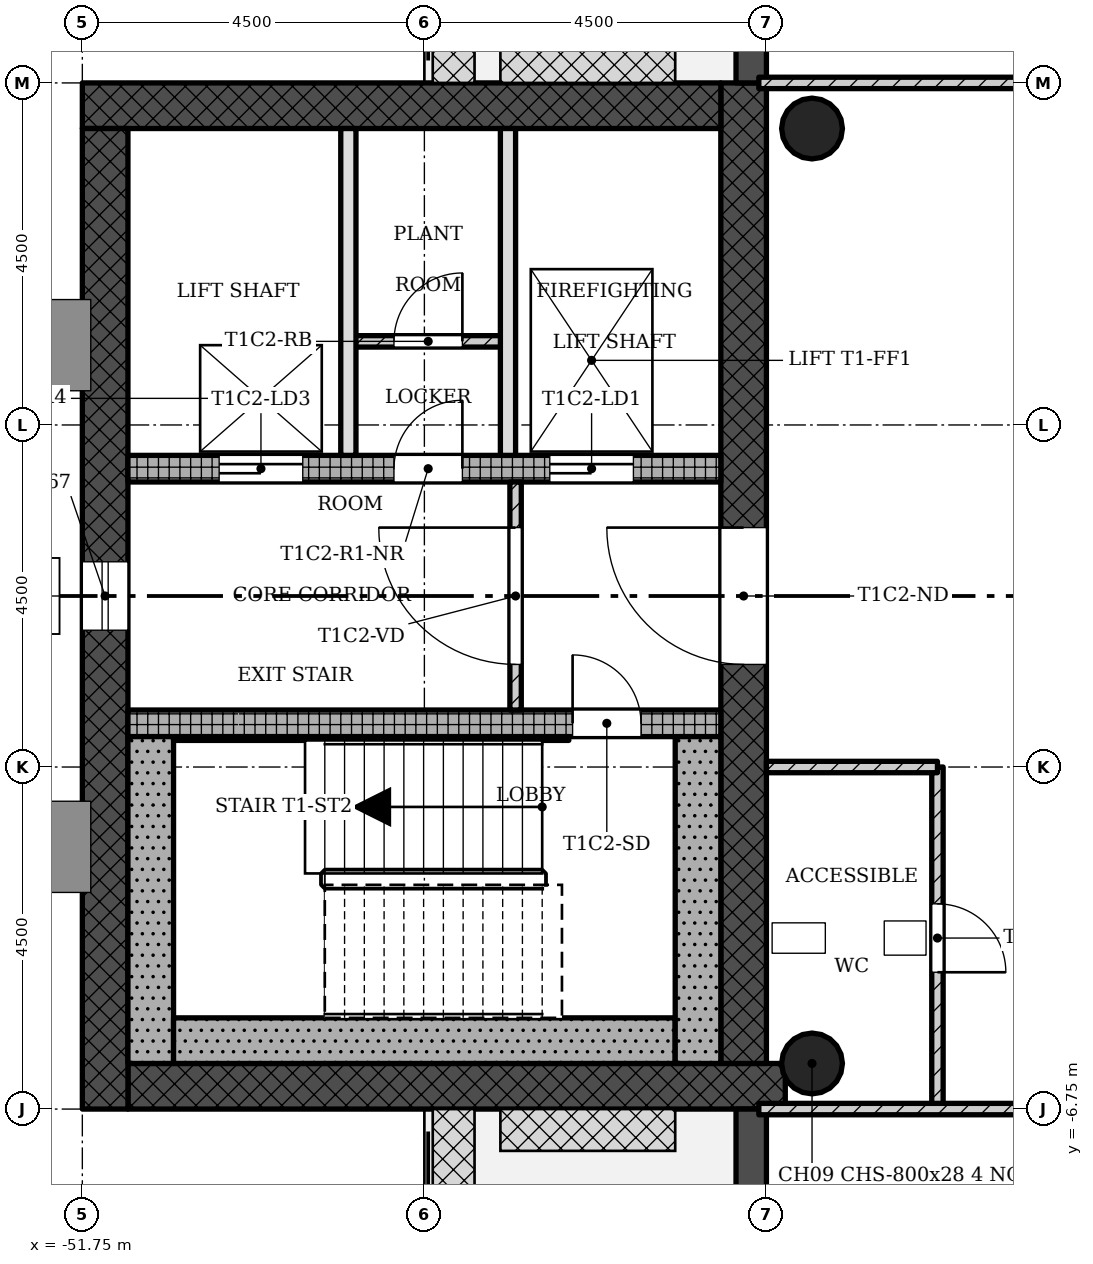
"""IFC4 building model, lengths in metres.
Left out: names, types, materials, properties, quantities, classifications, styles, units other than length and angle.
Written with IfcOpenShell. Run it as: python <this file> out.ifc"""

import sys

from ifc_helpers import new_model, si_unit, direction, frame, frame_2d, origin, origin_2d, place, context, subcontext, project, spatial, rectangle, hollow_circle, extrude, element, fill, save


model = new_model("IFC4")
c1 = context("Model", 3, precision=1e-05, world=origin(), true_north=direction((0.0, 1.0)))
c2 = subcontext(c1, "Body", "Model", "MODEL_VIEW")
j1 = project(units=[si_unit("LENGTHUNIT", "METRE"), si_unit("PLANEANGLEUNIT", "RADIAN")], contexts=[c1])
p1 = place(None, origin())
s1 = spatial("IfcSite", under=j1, at=p1, CompositionType="ELEMENT")
p2 = place(p1, origin())
s2 = spatial("IfcBuilding", under=s1, at=p2, CompositionType="ELEMENT")
p3 = place(p2, frame((0.0, 0.0, 242.4)))
s3 = spatial("IfcBuildingStorey", under=s2, at=p3, CompositionType="ELEMENT", Elevation=242.4)
p4 = place(p3, frame((-51.15, -6.45, 0.0), z_axis=(0.0, 0.0, 1.0), x_axis=(1.0, 0.0, 0.0)))
e1 = element("IfcWall", 1, at=p4, inside=s3, PredefinedType="SHEAR", context=c2, shape_type="SweptSolid", body=[
    extrude(rectangle(XDim=8.648, YDim=0.6, at=frame_2d((4.324, 0.0))), origin(), (0.0, 0.0, 1.0), 4.5),
])
p5 = place(p3, frame((-43.05, -6.15, 0.0), z_axis=(0.0, 0.0, 1.0), x_axis=(0.0, 1.0, 0.0)))
e2 = element("IfcWall", 2, at=p5, inside=s3, PredefinedType="SHEAR", context=c2, shape_type="SweptSolid", body=[
    extrude(rectangle(XDim=12.9, YDim=0.6, at=frame_2d((6.45, 0.0))), origin(), (0.0, 0.0, 1.0), 4.5),
])
p6 = place(p5, frame((5.25, 0.0, 0.0)))
e3 = element("IfcOpeningElement", 3, at=p6, cuts=e2, PredefinedType="OPENING", context=c2, shape_type="SweptSolid", body=[
    extrude(rectangle(XDim=1.8, YDim=2.1, at=frame_2d((0.9, 1.05))), frame((0.0, 0.31, 0.0), z_axis=(0.0, -1.0, 0.0), x_axis=(1.0, 0.0, 0.0)), (0.0, 0.0, 1.0), 0.62),
])
p7 = place(p3, frame((-43.35, 6.45, 0.0), z_axis=(0.0, 0.0, 1.0), x_axis=(-1.0, 0.0, 0.0)))
e4 = element("IfcWall", 4, at=p7, inside=s3, PredefinedType="SHEAR", context=c2, shape_type="SweptSolid", body=[
    extrude(rectangle(XDim=8.4, YDim=0.6, at=frame_2d((4.2, 0.0))), origin(), (0.0, 0.0, 1.0), 4.5),
])
p8 = place(p3, frame((-51.45, 6.15, 0.0), z_axis=(0.0, 0.0, 1.0), x_axis=(0.0, -1.0, 0.0)))
e5 = element("IfcWall", 5, at=p8, inside=s3, PredefinedType="SHEAR", context=c2, shape_type="SweptSolid", body=[
    extrude(rectangle(XDim=12.9, YDim=0.6, at=frame_2d((6.45, 0.0))), origin(), (0.0, 0.0, 1.0), 4.5),
])
p9 = place(p8, frame((5.7, 0.0, 0.45)))
e6 = element("IfcOpeningElement", 6, at=p9, cuts=e5, PredefinedType="OPENING", context=c2, shape_type="SweptSolid", body=[
    extrude(rectangle(XDim=0.9, YDim=2.4, at=frame_2d((0.45, 1.2))), frame((0.0, 0.31, 0.0), z_axis=(0.0, -1.0, 0.0), x_axis=(1.0, 0.0, 0.0)), (0.0, 0.0, 1.0), 0.62),
])
p10 = place(p3, frame((-51.15, -1.675, 0.0), z_axis=(0.0, 0.0, 1.0), x_axis=(1.0, 0.0, 0.0)))
e7 = element("IfcWall", 7, at=p10, inside=s3, PredefinedType="SHEAR", context=c2, shape_type="SweptSolid", body=[
    extrude(rectangle(XDim=7.8, YDim=0.35, at=frame_2d((3.9, 0.0))), origin(), (0.0, 0.0, 1.0), 4.5),
])
p11 = place(p10, frame((5.85, 0.0, 0.0)))
e8 = element("IfcOpeningElement", 8, at=p11, cuts=e7, PredefinedType="OPENING", context=c2, shape_type="SweptSolid", body=[
    extrude(rectangle(XDim=0.9, YDim=2.1, at=frame_2d((0.45, 1.05))), frame((0.0, 0.185, 0.0), z_axis=(0.0, -1.0, 0.0), x_axis=(1.0, 0.0, 0.0)), (0.0, 0.0, 1.0), 0.37),
])
p12 = place(p3, frame((-51.15, 1.675, 0.0), z_axis=(0.0, 0.0, 1.0), x_axis=(1.0, 0.0, 0.0)))
e9 = element("IfcWall", 9, at=p12, inside=s3, PredefinedType="SHEAR", context=c2, shape_type="SweptSolid", body=[
    extrude(rectangle(XDim=7.8, YDim=0.35, at=frame_2d((3.9, 0.0))), origin(), (0.0, 0.0, 1.0), 4.5),
])
p13 = place(p12, frame((5.55, 0.0, 0.0)))
e10 = element("IfcOpeningElement", 10, at=p13, cuts=e9, PredefinedType="OPENING", context=c2, shape_type="SweptSolid", body=[
    extrude(rectangle(XDim=1.1, YDim=2.1, at=frame_2d((0.55, 1.05))), frame((0.0, 0.185, 0.0), z_axis=(0.0, -1.0, 0.0), x_axis=(1.0, 0.0, 0.0)), (0.0, 0.0, 1.0), 0.37),
])
p14 = place(p12, frame((1.2, 0.0, 0.0)))
e11 = element("IfcOpeningElement", 11, at=p14, cuts=e9, PredefinedType="OPENING", context=c2, shape_type="SweptSolid", body=[
    extrude(rectangle(XDim=1.1, YDim=2.1, at=frame_2d((0.55, 1.05))), frame((0.0, 0.185, 0.0), z_axis=(0.0, -1.0, 0.0), x_axis=(1.0, 0.0, 0.0)), (0.0, 0.0, 1.0), 0.37),
])
p15 = place(p12, frame((3.5, 0.0, 0.0)))
e12 = element("IfcOpeningElement", 12, at=p15, cuts=e9, PredefinedType="OPENING", context=c2, shape_type="SweptSolid", body=[
    extrude(rectangle(XDim=0.9, YDim=2.1, at=frame_2d((0.45, 1.05))), frame((0.0, 0.185, 0.0), z_axis=(0.0, -1.0, 0.0), x_axis=(1.0, 0.0, 0.0)), (0.0, 0.0, 1.0), 0.37),
])
for number, where, z_axis, x_axis in (
    (13, (-42.15, -6.15, 0.0), (0.0, 0.0, 1.0), (1.0, 0.0, 0.0)),
    (14, (-42.15, 6.15, 0.0), (0.0, 0.0, 1.0), (1.0, 0.0, 0.0)),
):
    element("IfcColumn", number, at=place(p3, frame(where, z_axis=z_axis, x_axis=x_axis)), inside=s3, PredefinedType="COLUMN", context=c2, shape_type="SweptSolid", body=[
        extrude(hollow_circle(Radius=0.4, WallThickness=0.028, at=origin_2d()), origin(), (0.0, 0.0, 1.0), 4.5),
    ])
p16 = place(p3, frame((-42.95, -6.75, -0.02), z_axis=(0.0, 0.0, 1.0), x_axis=(0.0, -1.0, 0.0)))
e15 = element("IfcWall", 15, at=p16, inside=s3, PredefinedType="STANDARD", context=c2, shape_type="SweptSolid", body=[
    extrude(rectangle(XDim=4.5, YDim=0.4, at=frame_2d((2.25, 0.0))), origin(), (0.0, 0.0, 1.0), 4.22),
])
p17 = place(p16, frame((1.35, 0.0, 0.02)))
e16 = element("IfcOpeningElement", 16, at=p17, cuts=e15, PredefinedType="OPENING", context=c2, shape_type="SweptSolid", body=[
    extrude(rectangle(XDim=1.8, YDim=2.1, at=frame_2d((0.9, 1.05))), frame((0.0, 0.21, 0.0), z_axis=(0.0, -1.0, 0.0), x_axis=(1.0, 0.0, 0.0)), (0.0, 0.0, 1.0), 0.42),
])
p18 = place(p3, frame((-42.95, 11.25, -0.02), z_axis=(0.0, 0.0, 1.0), x_axis=(0.0, -1.0, 0.0)))
e17 = element("IfcWall", 17, at=p18, inside=s3, PredefinedType="STANDARD", context=c2, shape_type="SweptSolid", body=[
    extrude(rectangle(XDim=4.5, YDim=0.4, at=frame_2d((2.25, 0.0))), origin(), (0.0, 0.0, 1.0), 4.22),
])
p19 = place(p18, frame((1.35, 0.0, 0.02)))
e18 = element("IfcOpeningElement", 18, at=p19, cuts=e17, PredefinedType="OPENING", context=c2, shape_type="SweptSolid", body=[
    extrude(rectangle(XDim=1.8, YDim=2.1, at=frame_2d((0.9, 1.05))), frame((0.0, 0.21, 0.0), z_axis=(0.0, -1.0, 0.0), x_axis=(1.0, 0.0, 0.0)), (0.0, 0.0, 1.0), 0.42),
])
p20 = place(p3, frame((-46.05, 1.5, 0.0), z_axis=(0.0, 0.0, 1.0), x_axis=(0.0, -1.0, 0.0)))
e19 = element("IfcWall", 19, at=p20, inside=s3, PredefinedType="PARTITIONING", context=c2, shape_type="SweptSolid", body=[
    extrude(rectangle(XDim=3.0, YDim=0.15, at=frame_2d((1.5, 0.0))), origin(), (0.0, 0.0, 1.0), 4.08),
])
p21 = place(p20, frame((0.6, 0.0, 0.0)))
e20 = element("IfcOpeningElement", 20, at=p21, cuts=e19, PredefinedType="OPENING", context=c2, shape_type="SweptSolid", body=[
    extrude(rectangle(XDim=1.8, YDim=2.1, at=frame_2d((0.9, 1.05))), frame((0.0, 0.085, 0.0), z_axis=(0.0, -1.0, 0.0), x_axis=(1.0, 0.0, 0.0)), (0.0, 0.0, 1.0), 0.17),
])
for number, where, z_axis, x_axis in (
    (21, (-48.25, 6.15, 0.0), (0.0, 0.0, 1.0), (0.0, -1.0, 0.0)),
    (22, (-46.15, 6.15, 0.0), (0.0, 0.0, 1.0), (0.0, -1.0, 0.0)),
):
    element("IfcWall", number, at=place(p3, frame(where, z_axis=z_axis, x_axis=x_axis)), inside=s3, PredefinedType="SOLIDWALL", context=c2, shape_type="SweptSolid", body=[
        extrude(rectangle(XDim=4.3, YDim=0.2, at=frame_2d((2.15, 0.0))), origin(), (0.0, 0.0, 1.0), 4.08),
    ])
p22 = place(p3, frame((-46.15, 3.35, 0.0), z_axis=(0.0, 0.0, 1.0), x_axis=(-1.0, 0.0, 0.0)))
e23 = element("IfcWall", 23, at=p22, inside=s3, PredefinedType="PARTITIONING", context=c2, shape_type="SweptSolid", body=[
    extrude(rectangle(XDim=2.1, YDim=0.15, at=frame_2d((1.05, 0.0))), origin(), (0.0, 0.0, 1.0), 4.08),
])
p23 = place(p22, frame((0.6, 0.0, 0.0)))
e24 = element("IfcOpeningElement", 24, at=p23, cuts=e23, PredefinedType="OPENING", context=c2, shape_type="SweptSolid", body=[
    extrude(rectangle(XDim=0.9, YDim=2.1, at=frame_2d((0.45, 1.05))), frame((0.0, 0.085, 0.0), z_axis=(0.0, -1.0, 0.0), x_axis=(1.0, 0.0, 0.0)), (0.0, 0.0, 1.0), 0.17),
])
p24 = place(p3, frame((-40.5, -6.75, 0.0), z_axis=(0.0, 0.0, 1.0), x_axis=(0.0, 1.0, 0.0)))
e25 = element("IfcWall", 25, at=p24, inside=s3, PredefinedType="PARTITIONING", context=c2, shape_type="SweptSolid", body=[
    extrude(rectangle(XDim=4.5, YDim=0.15, at=frame_2d((2.25, 0.0))), origin(), (0.0, 0.0, 1.0), 4.08),
])
p25 = place(p24, frame((1.8, 0.0, 0.0)))
e26 = element("IfcOpeningElement", 26, at=p25, cuts=e25, PredefinedType="OPENING", context=c2, shape_type="SweptSolid", body=[
    extrude(rectangle(XDim=0.9, YDim=2.1, at=frame_2d((0.45, 1.05))), frame((0.0, 0.085, 0.0), z_axis=(0.0, -1.0, 0.0), x_axis=(1.0, 0.0, 0.0)), (0.0, 0.0, 1.0), 0.17),
])
p26 = place(p3, frame((-42.75, -2.25, 0.0), z_axis=(0.0, 0.0, 1.0), x_axis=(1.0, 0.0, 0.0)))
e27 = element("IfcWall", 27, at=p26, inside=s3, PredefinedType="PARTITIONING", context=c2, shape_type="SweptSolid", body=[
    extrude(rectangle(XDim=2.25, YDim=0.15, at=frame_2d((1.125, 0.0))), origin(), (0.0, 0.0, 1.0), 4.08),
])
p27 = place(p3, frame((-42.85, 6.75, 0.0), z_axis=(0.0, 0.0, 1.0), x_axis=(1.0, 0.0, 0.0)))
e28 = element("IfcWall", 28, at=p27, inside=s3, PredefinedType="PARTITIONING", context=c2, shape_type="SweptSolid", body=[
    extrude(rectangle(XDim=13.7, YDim=0.15, at=frame_2d((6.85, 0.0))), origin(), (0.0, 0.0, 1.0), 4.08),
])
p28 = place(p27, frame((5.95, 0.0, 0.0)))
e29 = element("IfcOpeningElement", 29, at=p28, cuts=e28, PredefinedType="OPENING", context=c2, shape_type="SweptSolid", body=[
    extrude(rectangle(XDim=1.8, YDim=2.1, at=frame_2d((0.9, 1.05))), frame((0.0, 0.085, 0.0), z_axis=(0.0, -1.0, 0.0), x_axis=(1.0, 0.0, 0.0)), (0.0, 0.0, 1.0), 0.17),
])
p29 = place(p3, frame((-42.85, -6.75, 0.0), z_axis=(0.0, 0.0, 1.0), x_axis=(1.0, 0.0, 0.0)))
e30 = element("IfcWall", 30, at=p29, inside=s3, PredefinedType="PARTITIONING", context=c2, shape_type="SweptSolid", body=[
    extrude(rectangle(XDim=13.7, YDim=0.15, at=frame_2d((6.85, 0.0))), origin(), (0.0, 0.0, 1.0), 4.08),
])
p30 = place(p29, frame((5.95, 0.0, 0.0)))
e31 = element("IfcOpeningElement", 31, at=p30, cuts=e30, PredefinedType="OPENING", context=c2, shape_type="SweptSolid", body=[
    extrude(rectangle(XDim=1.8, YDim=2.1, at=frame_2d((0.9, 1.05))), frame((0.0, 0.085, 0.0), z_axis=(0.0, -1.0, 0.0), x_axis=(1.0, 0.0, 0.0)), (0.0, 0.0, 1.0), 0.17),
])
p31 = place(p3, frame((-50.85, -1.85, 0.0), z_axis=(0.0, 0.0, 1.0), x_axis=(0.0, -1.0, 0.0)))
e32 = element("IfcWall", 32, at=p31, inside=s3, PredefinedType="SHEAR", context=c2, shape_type="SweptSolid", body=[
    extrude(rectangle(XDim=4.3, YDim=0.6, at=frame_2d((2.15, 0.0))), origin(), (0.0, 0.0, 1.0), 4.5),
])
p32 = place(p3, frame((-43.95, -5.85, 0.0), z_axis=(0.0, 0.0, 1.0), x_axis=(-1.0, 0.0, 0.0)))
e33 = element("IfcWall", 33, at=p32, inside=s3, PredefinedType="SHEAR", context=c2, shape_type="SweptSolid", body=[
    extrude(rectangle(XDim=6.6, YDim=0.6, at=frame_2d((3.3, 0.0))), origin(), (0.0, 0.0, 1.0), 4.5),
])
p33 = place(p3, frame((-43.65, -1.85, 0.0), z_axis=(0.0, 0.0, 1.0), x_axis=(0.0, -1.0, 0.0)))
e34 = element("IfcWall", 34, at=p33, inside=s3, PredefinedType="SHEAR", context=c2, shape_type="SweptSolid", body=[
    extrude(rectangle(XDim=4.3, YDim=0.6, at=frame_2d((2.15, 0.0))), origin(), (0.0, 0.0, 1.0), 4.5),
])
p34 = place(p3, frame((-45.35, -1.875, 0.0), z_axis=(0.0, 0.0, 1.0), x_axis=(-1.0, 0.0, 0.0)))
e35 = element("IfcWall", 35, at=p34, inside=s3, PredefinedType="SHEAR", context=c2, shape_type="SweptSolid", body=[
    extrude(rectangle(XDim=5.2, YDim=0.05, at=frame_2d((2.6, 0.0))), origin(), (0.0, 0.0, 1.0), 4.5),
])
p35 = place(p9, origin())
e36 = element("IfcWindow", 36, at=p35, inside=s3, PartitioningType="SINGLE_PANEL", PredefinedType="WINDOW", context=c2, shape_type="SweptSolid", body=[
    extrude(rectangle(XDim=0.9, YDim=2.4, at=frame_2d((0.45, 1.2))), frame((0.0, 0.03, 0.0), z_axis=(0.0, -1.0, 0.0), x_axis=(1.0, 0.0, 0.0)), (0.0, 0.0, 1.0), 0.06),
])
fill(e6, e36)
p36 = place(p21, origin())
e37 = element("IfcDoor", 37, at=p36, inside=s3, OperationType="SINGLE_SWING_LEFT", PredefinedType="DOOR", context=c2, shape_type="SweptSolid", body=[
    extrude(rectangle(XDim=1.8, YDim=2.1, at=frame_2d((0.9, 1.05))), frame((0.0, 0.025, 0.0), z_axis=(0.0, -1.0, 0.0), x_axis=(1.0, 0.0, 0.0)), (0.0, 0.0, 1.0), 0.05),
])
fill(e20, e37)
p37 = place(p23, origin())
e38 = element("IfcDoor", 38, at=p37, inside=s3, OperationType="SINGLE_SWING_LEFT", PredefinedType="DOOR", context=c2, shape_type="SweptSolid", body=[
    extrude(rectangle(XDim=0.9, YDim=2.1, at=frame_2d((0.45, 1.05))), frame((0.0, 0.025, 0.0), z_axis=(0.0, -1.0, 0.0), x_axis=(1.0, 0.0, 0.0)), (0.0, 0.0, 1.0), 0.05),
])
fill(e24, e38)
p38 = place(p25, origin())
e39 = element("IfcDoor", 39, at=p38, inside=s3, OperationType="SINGLE_SWING_LEFT", PredefinedType="DOOR", context=c2, shape_type="SweptSolid", body=[
    extrude(rectangle(XDim=0.9, YDim=2.1, at=frame_2d((0.45, 1.05))), frame((0.0, 0.025, 0.0), z_axis=(0.0, -1.0, 0.0), x_axis=(1.0, 0.0, 0.0)), (0.0, 0.0, 1.0), 0.05),
])
fill(e26, e39)
p39 = place(p11, origin())
e40 = element("IfcDoor", 40, at=p39, inside=s3, OperationType="SINGLE_SWING_RIGHT", PredefinedType="DOOR", context=c2, shape_type="SweptSolid", body=[
    extrude(rectangle(XDim=0.9, YDim=2.1, at=frame_2d((0.45, 1.05))), frame((0.0, 0.025, 0.0), z_axis=(0.0, -1.0, 0.0), x_axis=(1.0, 0.0, 0.0)), (0.0, 0.0, 1.0), 0.05),
])
fill(e8, e40)
p40 = place(p13, origin())
e41 = element("IfcDoor", 41, at=p40, inside=s3, OperationType="SLIDING_TO_LEFT", PredefinedType="DOOR", context=c2, shape_type="SweptSolid", body=[
    extrude(rectangle(XDim=1.1, YDim=2.1, at=frame_2d((0.55, 1.05))), frame((0.0, 0.025, 0.0), z_axis=(0.0, -1.0, 0.0), x_axis=(1.0, 0.0, 0.0)), (0.0, 0.0, 1.0), 0.05),
])
fill(e10, e41)
p41 = place(p14, origin())
e42 = element("IfcDoor", 42, at=p41, inside=s3, OperationType="SLIDING_TO_LEFT", PredefinedType="DOOR", context=c2, shape_type="SweptSolid", body=[
    extrude(rectangle(XDim=1.1, YDim=2.1, at=frame_2d((0.55, 1.05))), frame((0.0, 0.025, 0.0), z_axis=(0.0, -1.0, 0.0), x_axis=(1.0, 0.0, 0.0)), (0.0, 0.0, 1.0), 0.05),
])
fill(e11, e42)
p42 = place(p15, origin())
e43 = element("IfcDoor", 43, at=p42, inside=s3, OperationType="SINGLE_SWING_LEFT", PredefinedType="DOOR", context=c2, shape_type="SweptSolid", body=[
    extrude(rectangle(XDim=0.9, YDim=2.1, at=frame_2d((0.45, 1.05))), frame((0.0, 0.025, 0.0), z_axis=(0.0, -1.0, 0.0), x_axis=(1.0, 0.0, 0.0)), (0.0, 0.0, 1.0), 0.05),
])
fill(e12, e43)
p43 = place(p6, origin())
e44 = element("IfcDoor", 44, at=p43, inside=s3, OperationType="SINGLE_SWING_LEFT", PredefinedType="DOOR", context=c2, shape_type="SweptSolid", body=[
    extrude(rectangle(XDim=1.8, YDim=2.1, at=frame_2d((0.9, 1.05))), frame((0.0, 0.025, 0.0), z_axis=(0.0, -1.0, 0.0), x_axis=(1.0, 0.0, 0.0)), (0.0, 0.0, 1.0), 0.05),
])
fill(e3, e44)
save(model, sys.argv[1])
